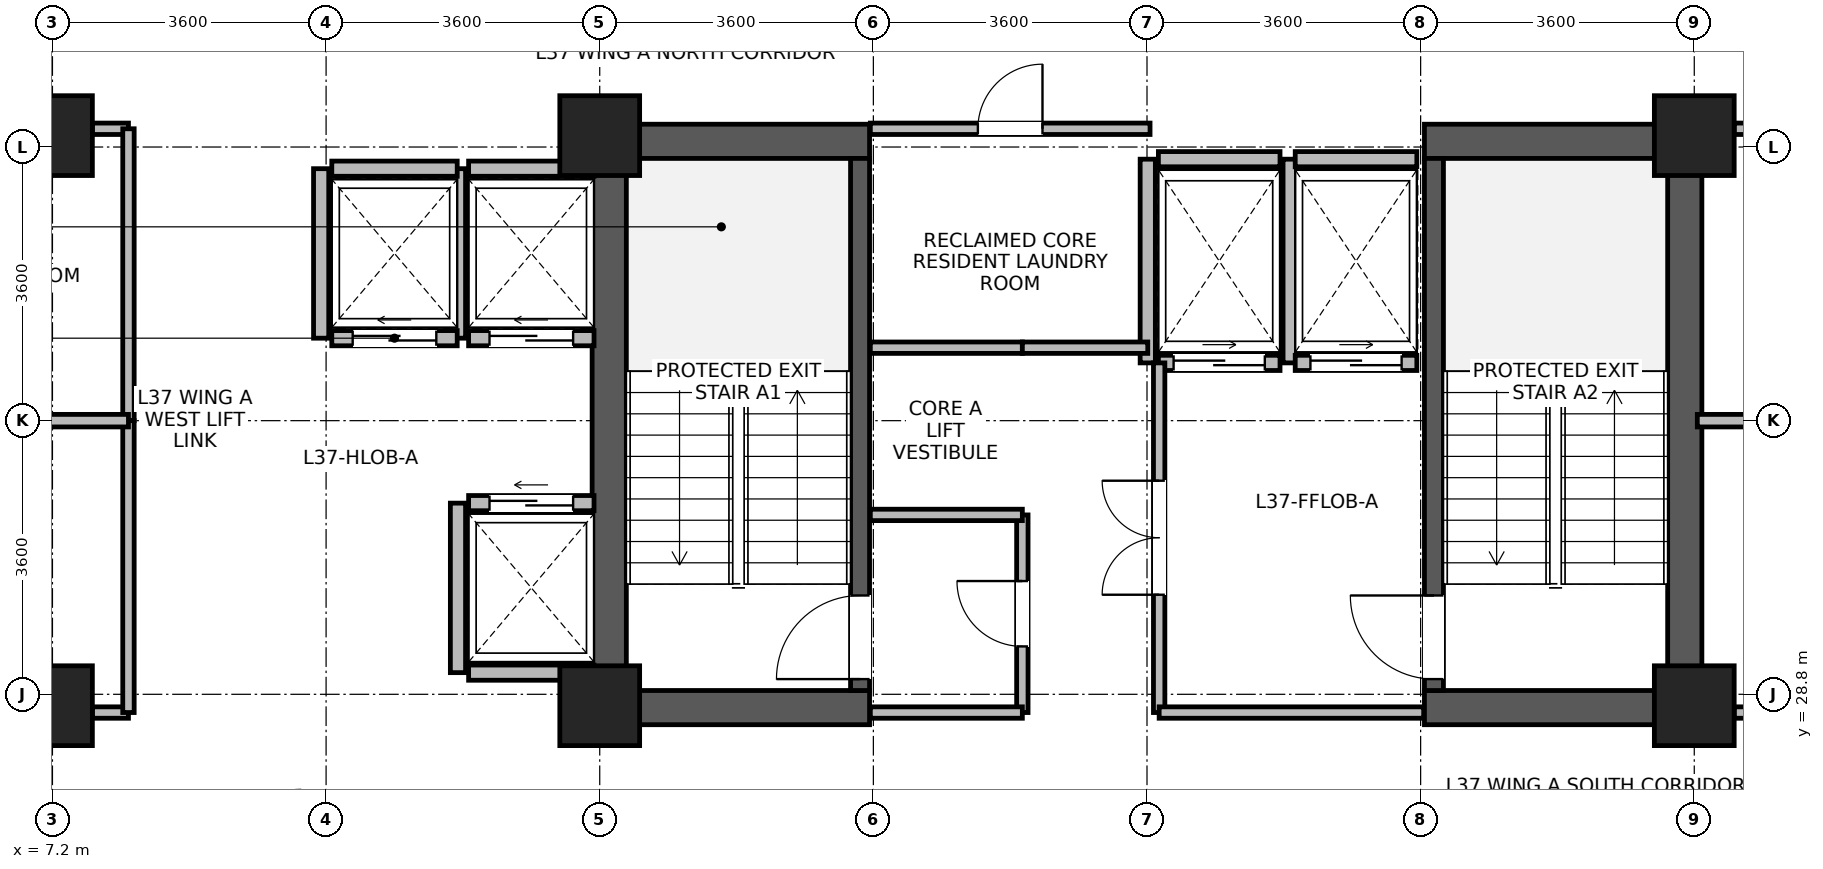
"""IFC4 building model, lengths in metres.
Left out: names, types, materials, properties, quantities, classifications, styles, units other than length and angle.
Written with IfcOpenShell. Run it as: python <this file> out.ifc"""

import sys

from ifc_helpers import new_model, si_unit, direction, frame, frame_2d, origin, origin_2d, place, context, subcontext, project, spatial, rectangle, extrude, source, transform, mapped, element, fill, save


model = new_model("IFC4")
c1 = context("Model", 3, precision=1e-05, world=origin(), true_north=direction((0.0, 1.0)))
c2 = subcontext(c1, "Body", "Model", "MODEL_VIEW")
j1 = project(units=[si_unit("LENGTHUNIT", "METRE"), si_unit("PLANEANGLEUNIT", "RADIAN")], contexts=[c1])
p1 = place(None, origin())
s1 = spatial("IfcSite", under=j1, at=p1, CompositionType="ELEMENT")
p2 = place(p1, origin())
s2 = spatial("IfcBuilding", under=s1, at=p2, CompositionType="ELEMENT")
p3 = place(p2, frame((0.0, 0.0, 147.6)))
s3 = spatial("IfcBuildingStorey", under=s2, at=p3, CompositionType="ELEMENT", Elevation=147.6)
for number, where, z_axis, x_axis in (
    (1, (14.525, 28.4, 0.0), (0.0, 0.0, 1.0), (0.0, 1.0, 0.0)),
    (2, (28.675, 28.4, 0.0), (0.0, 0.0, 1.0), (0.0, 1.0, 0.0)),
):
    element("IfcWall", number, at=place(p3, frame(where, z_axis=z_axis, x_axis=x_axis)), inside=s3, PredefinedType="SHEAR", context=c2, shape_type="SweptSolid", body=[
        extrude(rectangle(XDim=7.9, YDim=0.45, at=frame_2d((3.95, 0.0))), origin(), (0.0, 0.0, 1.0), 3.46),
    ])
for number, where, z_axis, x_axis in (
    (3, (14.75, 28.625, 0.0), (0.0, 0.0, 1.0), (1.0, 0.0, 0.0)),
    (4, (25.25, 28.625, 0.0), (0.0, 0.0, 1.0), (1.0, 0.0, 0.0)),
    (5, (14.75, 36.075, 0.0), (0.0, 0.0, 1.0), (1.0, 0.0, 0.0)),
    (6, (25.25, 36.075, 0.0), (0.0, 0.0, 1.0), (1.0, 0.0, 0.0)),
):
    element("IfcWall", number, at=place(p3, frame(where, z_axis=z_axis, x_axis=x_axis)), inside=s3, PredefinedType="SHEAR", context=c2, shape_type="SweptSolid", body=[
        extrude(rectangle(XDim=3.2, YDim=0.45, at=frame_2d((1.6, 0.0))), origin(), (0.0, 0.0, 1.0), 3.46),
    ])
p4 = place(p3, frame((17.825, 28.85, 0.0), z_axis=(0.0, 0.0, 1.0), x_axis=(0.0, 1.0, 0.0)))
e7 = element("IfcWall", 7, at=p4, inside=s3, PredefinedType="SHEAR", context=c2, shape_type="SweptSolid", body=[
    extrude(rectangle(XDim=7.0, YDim=0.25, at=frame_2d((3.5, 0.0))), origin(), (0.0, 0.0, 1.0), 3.46),
])
p5 = place(p4, frame((0.15, 0.0, 0.0)))
e8 = element("IfcOpeningElement", 8, at=p5, cuts=e7, PredefinedType="OPENING", context=c2, shape_type="SweptSolid", body=[
    extrude(rectangle(XDim=1.1, YDim=2.08, at=frame_2d((0.55, 1.04))), frame((0.0, 0.135, 0.0), z_axis=(0.0, -1.0, 0.0), x_axis=(1.0, 0.0, 0.0)), (0.0, 0.0, 1.0), 0.27),
])
p6 = place(p3, frame((25.375, 28.85, 0.0), z_axis=(0.0, 0.0, 1.0), x_axis=(0.0, 1.0, 0.0)))
e9 = element("IfcWall", 9, at=p6, inside=s3, PredefinedType="SHEAR", context=c2, shape_type="SweptSolid", body=[
    extrude(rectangle(XDim=7.0, YDim=0.25, at=frame_2d((3.5, 0.0))), origin(), (0.0, 0.0, 1.0), 3.46),
])
p7 = place(p6, frame((0.15, 0.0, 0.0)))
e10 = element("IfcOpeningElement", 10, at=p7, cuts=e9, PredefinedType="OPENING", context=c2, shape_type="SweptSolid", body=[
    extrude(rectangle(XDim=1.1, YDim=2.08, at=frame_2d((0.55, 1.04))), frame((0.0, 0.135, 0.0), z_axis=(0.0, -1.0, 0.0), x_axis=(1.0, 0.0, 0.0)), (0.0, 0.0, 1.0), 0.27),
])
m1 = source(origin(), c2, "Body", "SweptSolid", [
    extrude(rectangle(XDim=1.05, YDim=1.05, at=origin_2d()), origin(), (0.0, 0.0, 1.0), 3.7),
])
for number, where, z_axis, x_axis in (
    (11, (7.2, 28.65, 0.0), (0.0, 0.0, 1.0), (1.0, 0.0, 0.0)),
    (12, (7.2, 36.15, 0.0), (0.0, 0.0, 1.0), (1.0, 0.0, 0.0)),
    (13, (14.4, 28.65, 0.0), (0.0, 0.0, 1.0), (1.0, 0.0, 0.0)),
    (14, (14.4, 36.15, 0.0), (0.0, 0.0, 1.0), (1.0, 0.0, 0.0)),
    (15, (28.8, 28.65, 0.0), (0.0, 0.0, 1.0), (1.0, 0.0, 0.0)),
    (16, (28.8, 36.15, 0.0), (0.0, 0.0, 1.0), (1.0, 0.0, 0.0)),
):
    element("IfcColumn", number, at=place(p3, frame(where, z_axis=z_axis, x_axis=x_axis)), inside=s3, PredefinedType="COLUMN", context=c2, shape_type="MappedRepresentation", body=[
        mapped(m1, transform((0.0, 0.0, 0.0), x_axis=(1.0, 0.0, 0.0), y_axis=(0.0, 1.0, 0.0), z_axis=(0.0, 0.0, 1.0), scale=1.0)),
    ])
p8 = place(p3, frame((12.675, 33.485, 0.0), z_axis=(0.0, 0.0, 1.0), x_axis=(1.0, 0.0, 0.0)))
e17 = element("IfcWall", 17, at=p8, inside=s3, PredefinedType="PARTITIONING", context=c2, shape_type="SweptSolid", body=[
    extrude(rectangle(XDim=1.65, YDim=0.2, at=frame_2d((0.825, 0.0))), origin(), (0.0, 0.0, 1.0), 3.44),
])
p9 = place(p8, frame((0.275, 0.0, 0.0)))
e18 = element("IfcOpeningElement", 18, at=p9, cuts=e17, PredefinedType="OPENING", context=c2, shape_type="SweptSolid", body=[
    extrude(rectangle(XDim=1.1, YDim=2.12, at=frame_2d((0.55, 1.06))), frame((0.0, 0.11, 0.0), z_axis=(0.0, -1.0, 0.0), x_axis=(1.0, 0.0, 0.0)), (0.0, 0.0, 1.0), 0.22),
])
p10 = place(p3, frame((12.675, 35.715, 0.0), z_axis=(0.0, 0.0, 1.0), x_axis=(1.0, 0.0, 0.0)))
e19 = element("IfcWall", 19, at=p10, inside=s3, PredefinedType="PARTITIONING", context=c2, shape_type="SweptSolid", body=[
    extrude(rectangle(XDim=1.65, YDim=0.2, at=frame_2d((0.825, 0.0))), origin(), (0.0, 0.0, 1.0), 3.44),
])
p11 = place(p3, frame((12.535, 33.485, 0.0), z_axis=(0.0, 0.0, 1.0), x_axis=(0.0, 1.0, 0.0)))
e20 = element("IfcWall", 20, at=p11, inside=s3, PredefinedType="PARTITIONING", context=c2, shape_type="SweptSolid", body=[
    extrude(rectangle(XDim=2.23, YDim=0.2, at=frame_2d((1.115, 0.0))), origin(), (0.0, 0.0, 1.0), 3.44),
])
p12 = place(p3, frame((12.675, 29.085, 0.0), z_axis=(0.0, 0.0, 1.0), x_axis=(1.0, 0.0, 0.0)))
e21 = element("IfcWall", 21, at=p12, inside=s3, PredefinedType="PARTITIONING", context=c2, shape_type="SweptSolid", body=[
    extrude(rectangle(XDim=1.65, YDim=0.2, at=frame_2d((0.825, 0.0))), origin(), (0.0, 0.0, 1.0), 3.44),
])
p13 = place(p3, frame((12.675, 31.315, 0.0), z_axis=(0.0, 0.0, 1.0), x_axis=(1.0, 0.0, 0.0)))
e22 = element("IfcWall", 22, at=p13, inside=s3, PredefinedType="PARTITIONING", context=c2, shape_type="SweptSolid", body=[
    extrude(rectangle(XDim=1.65, YDim=0.2, at=frame_2d((0.825, 0.0))), origin(), (0.0, 0.0, 1.0), 3.44),
])
p14 = place(p13, frame((0.275, 0.0, 0.0)))
e23 = element("IfcOpeningElement", 23, at=p14, cuts=e22, PredefinedType="OPENING", context=c2, shape_type="SweptSolid", body=[
    extrude(rectangle(XDim=1.1, YDim=2.12, at=frame_2d((0.55, 1.06))), frame((0.0, 0.11, 0.0), z_axis=(0.0, -1.0, 0.0), x_axis=(1.0, 0.0, 0.0)), (0.0, 0.0, 1.0), 0.22),
])
p15 = place(p3, frame((12.535, 29.085, 0.0), z_axis=(0.0, 0.0, 1.0), x_axis=(0.0, 1.0, 0.0)))
e24 = element("IfcWall", 24, at=p15, inside=s3, PredefinedType="PARTITIONING", context=c2, shape_type="SweptSolid", body=[
    extrude(rectangle(XDim=2.23, YDim=0.2, at=frame_2d((1.115, 0.0))), origin(), (0.0, 0.0, 1.0), 3.44),
])
p16 = place(p3, frame((10.875, 33.485, 0.0), z_axis=(0.0, 0.0, 1.0), x_axis=(1.0, 0.0, 0.0)))
e25 = element("IfcWall", 25, at=p16, inside=s3, PredefinedType="PARTITIONING", context=c2, shape_type="SweptSolid", body=[
    extrude(rectangle(XDim=1.65, YDim=0.2, at=frame_2d((0.825, 0.0))), origin(), (0.0, 0.0, 1.0), 3.44),
])
p17 = place(p16, frame((0.275, 0.0, 0.0)))
e26 = element("IfcOpeningElement", 26, at=p17, cuts=e25, PredefinedType="OPENING", context=c2, shape_type="SweptSolid", body=[
    extrude(rectangle(XDim=1.1, YDim=2.12, at=frame_2d((0.55, 1.06))), frame((0.0, 0.11, 0.0), z_axis=(0.0, -1.0, 0.0), x_axis=(1.0, 0.0, 0.0)), (0.0, 0.0, 1.0), 0.22),
])
p18 = place(p3, frame((10.875, 35.715, 0.0), z_axis=(0.0, 0.0, 1.0), x_axis=(1.0, 0.0, 0.0)))
e27 = element("IfcWall", 27, at=p18, inside=s3, PredefinedType="PARTITIONING", context=c2, shape_type="SweptSolid", body=[
    extrude(rectangle(XDim=1.65, YDim=0.2, at=frame_2d((0.825, 0.0))), origin(), (0.0, 0.0, 1.0), 3.44),
])
p19 = place(p3, frame((10.735, 33.485, 0.0), z_axis=(0.0, 0.0, 1.0), x_axis=(0.0, 1.0, 0.0)))
e28 = element("IfcWall", 28, at=p19, inside=s3, PredefinedType="PARTITIONING", context=c2, shape_type="SweptSolid", body=[
    extrude(rectangle(XDim=2.23, YDim=0.2, at=frame_2d((1.115, 0.0))), origin(), (0.0, 0.0, 1.0), 3.44),
])
p20 = place(p3, frame((21.75, 33.16, 0.0), z_axis=(0.0, 0.0, 1.0), x_axis=(1.0, 0.0, 0.0)))
e29 = element("IfcWall", 29, at=p20, inside=s3, PredefinedType="PARTITIONING", context=c2, shape_type="SweptSolid", body=[
    extrude(rectangle(XDim=1.6, YDim=0.2, at=frame_2d((0.8, 0.0))), origin(), (0.0, 0.0, 1.0), 3.44),
])
p21 = place(p20, frame((0.2, 0.0, 0.0)))
e30 = element("IfcOpeningElement", 30, at=p21, cuts=e29, PredefinedType="OPENING", context=c2, shape_type="SweptSolid", body=[
    extrude(rectangle(XDim=1.2, YDim=2.12, at=frame_2d((0.6, 1.06))), frame((0.0, 0.11, 0.0), z_axis=(0.0, -1.0, 0.0), x_axis=(1.0, 0.0, 0.0)), (0.0, 0.0, 1.0), 0.22),
])
p22 = place(p3, frame((21.75, 35.84, 0.0), z_axis=(0.0, 0.0, 1.0), x_axis=(1.0, 0.0, 0.0)))
e31 = element("IfcWall", 31, at=p22, inside=s3, PredefinedType="PARTITIONING", context=c2, shape_type="SweptSolid", body=[
    extrude(rectangle(XDim=1.6, YDim=0.2, at=frame_2d((0.8, 0.0))), origin(), (0.0, 0.0, 1.0), 2.44),
])
for number, where, z_axis, x_axis in (
    (32, (21.61, 33.16, 0.0), (0.0, 0.0, 1.0), (0.0, 1.0, 0.0)),
    (33, (23.49, 33.16, 0.0), (0.0, 0.0, 1.0), (0.0, 1.0, 0.0)),
):
    element("IfcWall", number, at=place(p3, frame(where, z_axis=z_axis, x_axis=x_axis)), inside=s3, PredefinedType="PARTITIONING", context=c2, shape_type="SweptSolid", body=[
        extrude(rectangle(XDim=2.68, YDim=0.2, at=frame_2d((1.34, 0.0))), origin(), (0.0, 0.0, 1.0), 3.44),
    ])
p23 = place(p3, frame((23.55, 33.16, 0.0), z_axis=(0.0, 0.0, 1.0), x_axis=(1.0, 0.0, 0.0)))
e34 = element("IfcWall", 34, at=p23, inside=s3, PredefinedType="PARTITIONING", context=c2, shape_type="SweptSolid", body=[
    extrude(rectangle(XDim=1.6, YDim=0.2, at=frame_2d((0.8, 0.0))), origin(), (0.0, 0.0, 1.0), 3.44),
])
p24 = place(p23, frame((0.2, 0.0, 0.0)))
e35 = element("IfcOpeningElement", 35, at=p24, cuts=e34, PredefinedType="OPENING", context=c2, shape_type="SweptSolid", body=[
    extrude(rectangle(XDim=1.2, YDim=2.12, at=frame_2d((0.6, 1.06))), frame((0.0, 0.11, 0.0), z_axis=(0.0, -1.0, 0.0), x_axis=(1.0, 0.0, 0.0)), (0.0, 0.0, 1.0), 0.22),
])
p25 = place(p3, frame((23.55, 35.84, 0.0), z_axis=(0.0, 0.0, 1.0), x_axis=(1.0, 0.0, 0.0)))
e36 = element("IfcWall", 36, at=p25, inside=s3, PredefinedType="PARTITIONING", context=c2, shape_type="SweptSolid", body=[
    extrude(rectangle(XDim=1.6, YDim=0.2, at=frame_2d((0.8, 0.0))), origin(), (0.0, 0.0, 1.0), 2.44),
])
for number, where, z_axis, x_axis in (
    (37, (7.725, 28.56, 0.0), (0.0, 0.0, 1.0), (1.0, 0.0, 0.0)),
    (38, (7.725, 36.24, 0.0), (0.0, 0.0, 1.0), (1.0, 0.0, 0.0)),
):
    element("IfcWall", number, at=place(p3, frame(where, z_axis=z_axis, x_axis=x_axis)), inside=s3, PredefinedType="PARTITIONING", context=c2, shape_type="SweptSolid", body=[
        extrude(rectangle(XDim=0.475, YDim=0.15, at=frame_2d((0.237, 0.0))), origin(), (0.0, 0.0, 1.0), 2.84),
    ])
p26 = place(p3, frame((8.2, 32.4, 0.0), z_axis=(0.0, 0.0, 1.0), x_axis=(0.0, 1.0, 0.0)))
e39 = element("IfcWall", 39, at=p26, inside=s3, PredefinedType="PARTITIONING", context=c2, shape_type="SweptSolid", body=[
    extrude(rectangle(XDim=3.84, YDim=0.15, at=frame_2d((1.92, 0.0))), origin(), (0.0, 0.0, 1.0), 3.44),
])
p27 = place(p3, frame((8.2, 28.56, 0.0), z_axis=(0.0, 0.0, 1.0), x_axis=(0.0, 1.0, 0.0)))
e40 = element("IfcWall", 40, at=p27, inside=s3, PredefinedType="PARTITIONING", context=c2, shape_type="SweptSolid", body=[
    extrude(rectangle(XDim=3.84, YDim=0.15, at=frame_2d((1.92, 0.0))), origin(), (0.0, 0.0, 1.0), 3.44),
])
p28 = place(p3, frame((17.96, 36.24, 0.0), z_axis=(0.0, 0.0, 1.0), x_axis=(1.0, 0.0, 0.0)))
e41 = element("IfcWall", 41, at=p28, inside=s3, PredefinedType="PARTITIONING", context=c2, shape_type="SweptSolid", body=[
    extrude(rectangle(XDim=3.68, YDim=0.15, at=frame_2d((1.84, 0.0))), origin(), (0.0, 0.0, 1.0), 2.44),
])
p29 = place(p28, frame((1.415, 0.0, 0.0)))
e42 = element("IfcOpeningElement", 42, at=p29, cuts=e41, PredefinedType="OPENING", context=c2, shape_type="SweptSolid", body=[
    extrude(rectangle(XDim=0.85, YDim=2.04, at=frame_2d((0.425, 1.02))), frame((0.0, 0.085, 0.0), z_axis=(0.0, -1.0, 0.0), x_axis=(1.0, 0.0, 0.0)), (0.0, 0.0, 1.0), 0.17),
])
p30 = place(p3, frame((19.96, 28.56, 0.0), z_axis=(0.0, 0.0, 1.0), x_axis=(0.0, 1.0, 0.0)))
e43 = element("IfcWall", 43, at=p30, inside=s3, PredefinedType="PARTITIONING", context=c2, shape_type="SweptSolid", body=[
    extrude(rectangle(XDim=2.6, YDim=0.15, at=frame_2d((1.3, 0.0))), origin(), (0.0, 0.0, 1.0), 3.44),
])
p31 = place(p30, frame((0.87, 0.0, 0.0)))
e44 = element("IfcOpeningElement", 44, at=p31, cuts=e43, PredefinedType="OPENING", context=c2, shape_type="SweptSolid", body=[
    extrude(rectangle(XDim=0.86, YDim=2.02, at=frame_2d((0.43, 1.01))), frame((0.0, 0.085, 0.0), z_axis=(0.0, -1.0, 0.0), x_axis=(1.0, 0.0, 0.0)), (0.0, 0.0, 1.0), 0.17),
])
p32 = place(p3, frame((17.96, 28.56, 0.0), z_axis=(0.0, 0.0, 1.0), x_axis=(1.0, 0.0, 0.0)))
e45 = element("IfcWall", 45, at=p32, inside=s3, PredefinedType="PARTITIONING", context=c2, shape_type="SweptSolid", body=[
    extrude(rectangle(XDim=2.0, YDim=0.15, at=frame_2d((1.0, 0.0))), origin(), (0.0, 0.0, 1.0), 2.44),
])
for number, where, z_axis, x_axis in (
    (46, (17.96, 31.16, 0.0), (0.0, 0.0, 1.0), (1.0, 0.0, 0.0)),
    (47, (17.96, 33.36, 0.0), (0.0, 0.0, 1.0), (1.0, 0.0, 0.0)),
):
    element("IfcWall", number, at=place(p3, frame(where, z_axis=z_axis, x_axis=x_axis)), inside=s3, PredefinedType="PARTITIONING", context=c2, shape_type="SweptSolid", body=[
        extrude(rectangle(XDim=2.0, YDim=0.15, at=frame_2d((1.0, 0.0))), origin(), (0.0, 0.0, 1.0), 3.44),
    ])
for number, where, z_axis, x_axis in (
    (48, (29.325, 28.56, 0.0), (0.0, 0.0, 1.0), (1.0, 0.0, 0.0)),
    (49, (29.325, 36.24, 0.0), (0.0, 0.0, 1.0), (1.0, 0.0, 0.0)),
):
    element("IfcWall", number, at=place(p3, frame(where, z_axis=z_axis, x_axis=x_axis)), inside=s3, PredefinedType="PARTITIONING", context=c2, shape_type="SweptSolid", body=[
        extrude(rectangle(XDim=1.235, YDim=0.15, at=frame_2d((0.618, 0.0))), origin(), (0.0, 0.0, 1.0), 2.84),
    ])
p33 = place(p3, frame((19.96, 33.36, 0.0), z_axis=(0.0, 0.0, 1.0), x_axis=(1.0, 0.0, 0.0)))
e50 = element("IfcWall", 50, at=p33, inside=s3, PredefinedType="PARTITIONING", context=c2, shape_type="SweptSolid", body=[
    extrude(rectangle(XDim=1.65, YDim=0.15, at=frame_2d((0.825, 0.0))), origin(), (0.0, 0.0, 1.0), 3.44),
])
p34 = place(p3, frame((0.632, 32.4, 0.0), z_axis=(0.0, 0.0, 1.0), x_axis=(1.0, 0.0, 0.0)))
e51 = element("IfcWall", 51, at=p34, inside=s3, PredefinedType="PARTITIONING", context=c2, shape_type="SweptSolid", body=[
    extrude(rectangle(XDim=7.568, YDim=0.165, at=frame_2d((3.784, 0.0))), origin(), (0.0, 0.0, 1.0), 3.44),
])
p35 = place(p3, frame((21.76, 28.56, 0.0), z_axis=(0.0, 0.0, 1.0), x_axis=(0.0, 1.0, 0.0)))
e52 = element("IfcWall", 52, at=p35, inside=s3, PredefinedType="PARTITIONING", context=c2, shape_type="SweptSolid", body=[
    extrude(rectangle(XDim=4.6, YDim=0.15, at=frame_2d((2.3, 0.0))), origin(), (0.0, 0.0, 1.0), 3.44),
])
p36 = place(p35, frame((1.55, 0.0, 0.0)))
e53 = element("IfcOpeningElement", 53, at=p36, cuts=e52, PredefinedType="OPENING", context=c2, shape_type="SweptSolid", body=[
    extrude(rectangle(XDim=1.5, YDim=2.1, at=frame_2d((0.75, 1.05))), frame((0.0, 0.085, 0.0), z_axis=(0.0, -1.0, 0.0), x_axis=(1.0, 0.0, 0.0)), (0.0, 0.0, 1.0), 0.17),
])
p37 = place(p3, frame((21.76, 28.56, 0.0), z_axis=(0.0, 0.0, 1.0), x_axis=(1.0, 0.0, 0.0)))
e54 = element("IfcWall", 54, at=p37, inside=s3, PredefinedType="PARTITIONING", context=c2, shape_type="SweptSolid", body=[
    extrude(rectangle(XDim=3.48, YDim=0.15, at=frame_2d((1.74, 0.0))), origin(), (0.0, 0.0, 1.0), 2.44),
])
p38 = place(p3, frame((28.84, 32.4, 0.0), z_axis=(0.0, 0.0, 1.0), x_axis=(1.0, 0.0, 0.0)))
e55 = element("IfcWall", 55, at=p38, inside=s3, PredefinedType="PARTITIONING", context=c2, shape_type="SweptSolid", body=[
    extrude(rectangle(XDim=1.72, YDim=0.165, at=frame_2d((0.86, 0.0))), origin(), (0.0, 0.0, 1.0), 3.44),
])
p39 = place(p5, origin())
e56 = element("IfcDoor", 56, at=p39, inside=s3, OperationType="SINGLE_SWING_LEFT", PredefinedType="DOOR", context=c2, shape_type="SweptSolid", body=[
    extrude(rectangle(XDim=1.1, YDim=2.08, at=frame_2d((0.55, 1.04))), frame((0.0, 0.025, 0.0), z_axis=(0.0, -1.0, 0.0), x_axis=(1.0, 0.0, 0.0)), (0.0, 0.0, 1.0), 0.05),
])
fill(e8, e56)
p40 = place(p7, origin())
e57 = element("IfcDoor", 57, at=p40, inside=s3, OperationType="SINGLE_SWING_RIGHT", PredefinedType="DOOR", context=c2, shape_type="SweptSolid", body=[
    extrude(rectangle(XDim=1.1, YDim=2.08, at=frame_2d((0.55, 1.04))), frame((0.0, 0.025, 0.0), z_axis=(0.0, -1.0, 0.0), x_axis=(1.0, 0.0, 0.0)), (0.0, 0.0, 1.0), 0.05),
])
fill(e10, e57)
p41 = place(p9, origin())
e58 = element("IfcDoor", 58, at=p41, inside=s3, OperationType="SLIDING_TO_LEFT", PredefinedType="DOOR", context=c2, shape_type="SweptSolid", body=[
    extrude(rectangle(XDim=1.1, YDim=2.12, at=frame_2d((0.55, 1.06))), frame((0.0, 0.025, 0.0), z_axis=(0.0, -1.0, 0.0), x_axis=(1.0, 0.0, 0.0)), (0.0, 0.0, 1.0), 0.05),
])
fill(e18, e58)
p42 = place(p14, origin())
e59 = element("IfcDoor", 59, at=p42, inside=s3, OperationType="SLIDING_TO_LEFT", PredefinedType="DOOR", context=c2, shape_type="SweptSolid", body=[
    extrude(rectangle(XDim=1.1, YDim=2.12, at=frame_2d((0.55, 1.06))), frame((0.0, 0.025, 0.0), z_axis=(0.0, -1.0, 0.0), x_axis=(1.0, 0.0, 0.0)), (0.0, 0.0, 1.0), 0.05),
])
fill(e23, e59)
p43 = place(p17, origin())
e60 = element("IfcDoor", 60, at=p43, inside=s3, OperationType="SLIDING_TO_LEFT", PredefinedType="DOOR", context=c2, shape_type="SweptSolid", body=[
    extrude(rectangle(XDim=1.1, YDim=2.12, at=frame_2d((0.55, 1.06))), frame((0.0, 0.025, 0.0), z_axis=(0.0, -1.0, 0.0), x_axis=(1.0, 0.0, 0.0)), (0.0, 0.0, 1.0), 0.05),
])
fill(e26, e60)
p44 = place(p21, origin())
e61 = element("IfcDoor", 61, at=p44, inside=s3, OperationType="SLIDING_TO_RIGHT", PredefinedType="DOOR", context=c2, shape_type="SweptSolid", body=[
    extrude(rectangle(XDim=1.2, YDim=2.12, at=frame_2d((0.6, 1.06))), frame((0.0, 0.025, 0.0), z_axis=(0.0, -1.0, 0.0), x_axis=(1.0, 0.0, 0.0)), (0.0, 0.0, 1.0), 0.05),
])
fill(e30, e61)
p45 = place(p24, origin())
e62 = element("IfcDoor", 62, at=p45, inside=s3, OperationType="SLIDING_TO_RIGHT", PredefinedType="DOOR", context=c2, shape_type="SweptSolid", body=[
    extrude(rectangle(XDim=1.2, YDim=2.12, at=frame_2d((0.6, 1.06))), frame((0.0, 0.025, 0.0), z_axis=(0.0, -1.0, 0.0), x_axis=(1.0, 0.0, 0.0)), (0.0, 0.0, 1.0), 0.05),
])
fill(e35, e62)
p46 = place(p29, origin())
e63 = element("IfcDoor", 63, at=p46, inside=s3, OperationType="SINGLE_SWING_RIGHT", PredefinedType="DOOR", context=c2, shape_type="SweptSolid", body=[
    extrude(rectangle(XDim=0.85, YDim=2.04, at=frame_2d((0.425, 1.02))), frame((0.0, 0.025, 0.0), z_axis=(0.0, -1.0, 0.0), x_axis=(1.0, 0.0, 0.0)), (0.0, 0.0, 1.0), 0.05),
])
fill(e42, e63)
p47 = place(p31, origin())
e64 = element("IfcDoor", 64, at=p47, inside=s3, OperationType="SINGLE_SWING_RIGHT", PredefinedType="DOOR", context=c2, shape_type="SweptSolid", body=[
    extrude(rectangle(XDim=0.86, YDim=2.02, at=frame_2d((0.43, 1.01))), frame((0.0, 0.025, 0.0), z_axis=(0.0, -1.0, 0.0), x_axis=(1.0, 0.0, 0.0)), (0.0, 0.0, 1.0), 0.05),
])
fill(e44, e64)
p48 = place(p36, origin())
e65 = element("IfcDoor", 65, at=p48, inside=s3, OperationType="DOUBLE_DOOR_SINGLE_SWING", PredefinedType="DOOR", context=c2, shape_type="SweptSolid", body=[
    extrude(rectangle(XDim=1.5, YDim=2.1, at=frame_2d((0.75, 1.05))), frame((0.0, 0.025, 0.0), z_axis=(0.0, -1.0, 0.0), x_axis=(1.0, 0.0, 0.0)), (0.0, 0.0, 1.0), 0.05),
])
fill(e53, e65)
save(model, sys.argv[1])
